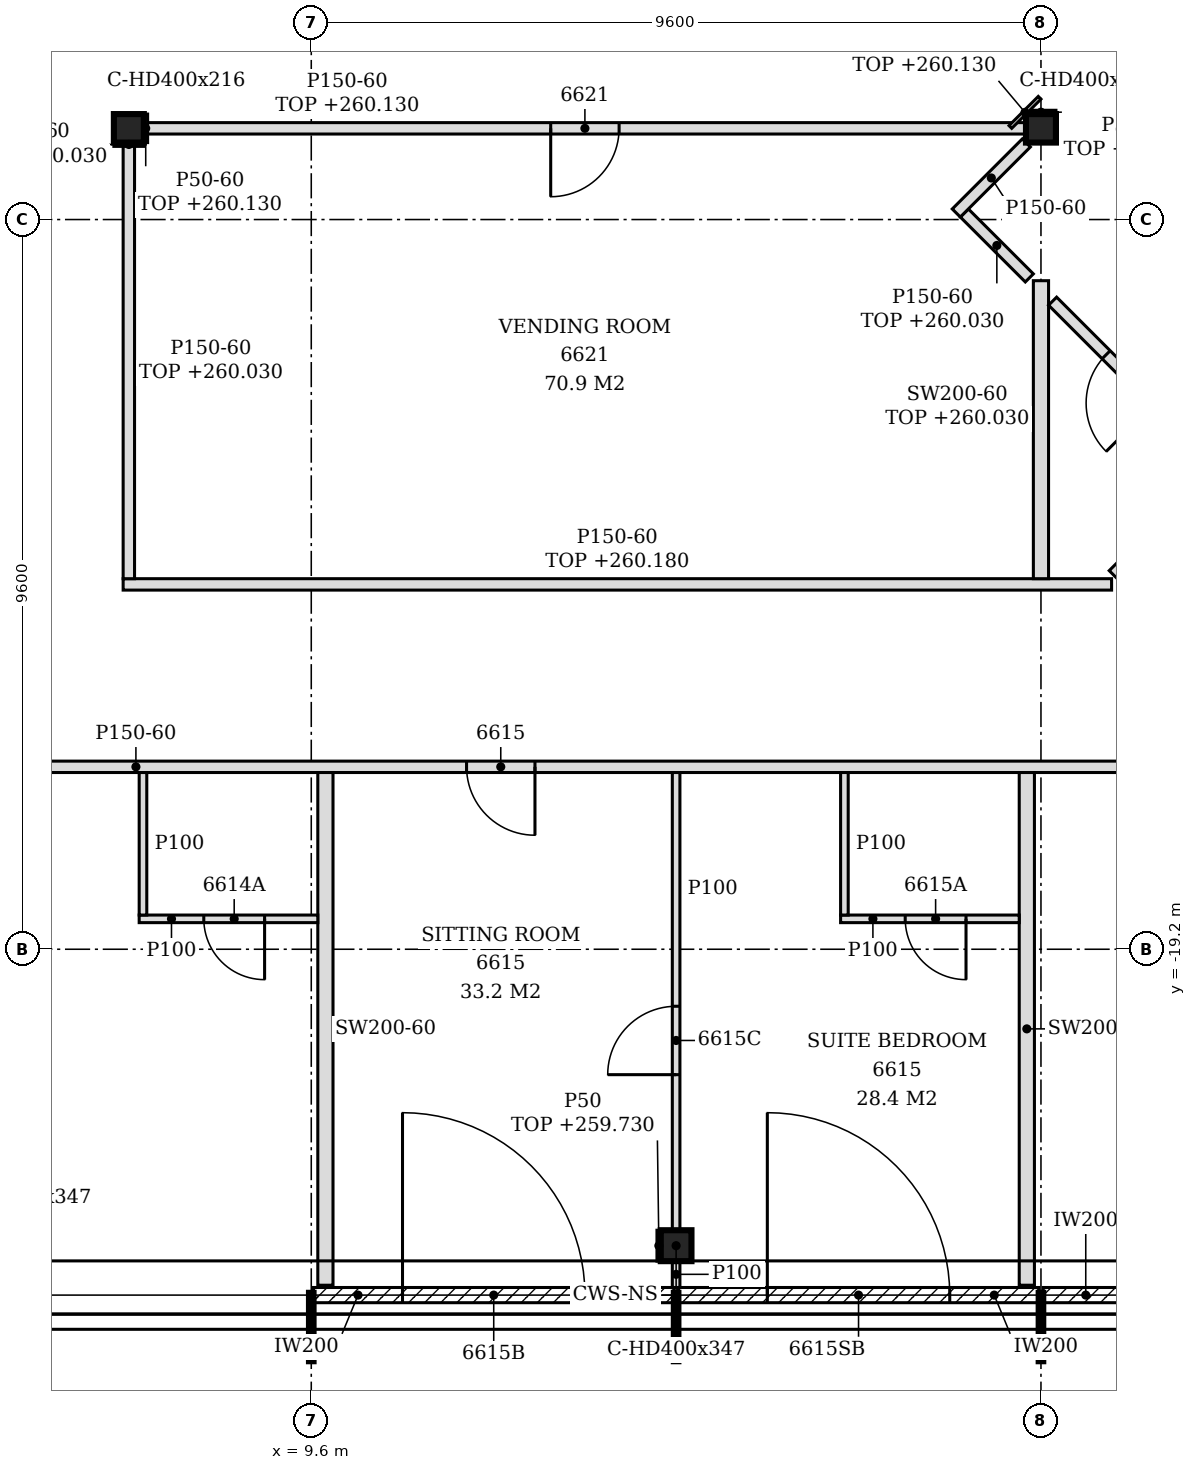
"""IFC4 building model, lengths in metres.
Left out: names, types, materials, properties, quantities, classifications, styles, units other than length and angle.
Written with IfcOpenShell. Run it as: python <this file> out.ifc"""

import sys

from ifc_helpers import new_model, si_unit, direction, frame, frame_2d, origin, origin_2d, place, context, subcontext, project, spatial, polyline, rectangle, i_section, outline, extrude, element, fill, save


model = new_model("IFC4")
c1 = context("Model", 3, precision=1e-05, world=origin(), true_north=direction((0.0, 1.0)))
c2 = subcontext(c1, "Body", "Model", "MODEL_VIEW")
j1 = project(units=[si_unit("LENGTHUNIT", "METRE"), si_unit("PLANEANGLEUNIT", "RADIAN")], contexts=[c1])
p1 = place(None, origin())
s1 = spatial("IfcSite", under=j1, at=p1, CompositionType="ELEMENT")
p2 = place(p1, origin())
s2 = spatial("IfcBuilding", under=s1, at=p2, CompositionType="ELEMENT")
p3 = place(p2, frame((0.0, 0.0, 257.4)))
s3 = spatial("IfcBuildingStorey", under=s2, at=p3, CompositionType="ELEMENT", Elevation=257.4)
p4 = place(p3, frame((14.4, -23.1, -0.15), z_axis=(0.0, 0.0, 1.0), x_axis=(1.0, 0.0, 0.0)))
e1 = element("IfcColumn", 1, at=p4, inside=s3, PredefinedType="COLUMN", context=c2, shape_type="SweptSolid", body=[
    extrude(i_section(OverallWidth=0.404, OverallDepth=0.407, WebThickness=0.027, FlangeThickness=0.044, FilletRadius=0.015, at=origin_2d()), origin(), (0.0, 0.0, 1.0), 3.5),
])
for number, where, z_axis, x_axis in (
    (2, (7.2, -8.4, -0.15), (0.0, 0.0, 1.0), (1.0, 0.0, 0.0)),
    (3, (19.2, -8.4, -0.15), (0.0, 0.0, 1.0), (1.0, 0.0, 0.0)),
):
    element("IfcColumn", number, at=place(p3, frame(where, z_axis=z_axis, x_axis=x_axis)), inside=s3, PredefinedType="COLUMN", context=c2, shape_type="SweptSolid", body=[
        extrude(i_section(OverallWidth=0.394, OverallDepth=0.375, WebThickness=0.017, FlangeThickness=0.028, FilletRadius=0.015, at=origin_2d()), origin(), (0.0, 0.0, 1.0), 3.5),
    ])
p5 = place(p3, frame((9.63, -23.75, 0.0), z_axis=(0.0, 0.0, 1.0), x_axis=(1.0, 0.0, 0.0)))
e4 = element("IfcWall", 4, at=p5, inside=s3, PredefinedType="NOTDEFINED", context=c2, shape_type="SweptSolid", body=[
    extrude(rectangle(XDim=4.74, YDim=0.2, at=frame_2d((2.37, 0.0))), origin(), (0.0, 0.0, 1.0), 3.35),
])
p6 = place(p5, frame((1.17, 0.0, 0.0)))
e5 = element("IfcOpeningElement", 5, at=p6, cuts=e4, PredefinedType="OPENING", context=c2, shape_type="SweptSolid", body=[
    extrude(rectangle(XDim=2.4, YDim=2.4, at=frame_2d((1.2, 1.2))), frame((0.0, 0.11, 0.0), z_axis=(0.0, -1.0, 0.0), x_axis=(1.0, 0.0, 0.0)), (0.0, 0.0, 1.0), 0.22),
])
p7 = place(p3, frame((14.43, -23.75, 0.0), z_axis=(0.0, 0.0, 1.0), x_axis=(1.0, 0.0, 0.0)))
e6 = element("IfcWall", 6, at=p7, inside=s3, PredefinedType="NOTDEFINED", context=c2, shape_type="SweptSolid", body=[
    extrude(rectangle(XDim=4.74, YDim=0.2, at=frame_2d((2.37, 0.0))), origin(), (0.0, 0.0, 1.0), 3.35),
])
p8 = place(p7, frame((1.17, 0.0, 0.0)))
e7 = element("IfcOpeningElement", 7, at=p8, cuts=e6, PredefinedType="OPENING", context=c2, shape_type="SweptSolid", body=[
    extrude(rectangle(XDim=2.4, YDim=2.4, at=frame_2d((1.2, 1.2))), frame((0.0, 0.11, 0.0), z_axis=(0.0, -1.0, 0.0), x_axis=(1.0, 0.0, 0.0)), (0.0, 0.0, 1.0), 0.22),
])
p9 = place(p3, frame((19.23, -23.75, 0.0), z_axis=(0.0, 0.0, 1.0), x_axis=(1.0, 0.0, 0.0)))
e8 = element("IfcWall", 8, at=p9, inside=s3, PredefinedType="NOTDEFINED", context=c2, shape_type="SweptSolid", body=[
    extrude(rectangle(XDim=4.626, YDim=0.2, at=frame_2d((2.313, 0.0))), origin(), (0.0, 0.0, 1.0), 3.35),
])
p10 = place(p9, frame((1.119, 0.0, 0.0)))
e9 = element("IfcOpeningElement", 9, at=p10, cuts=e8, PredefinedType="OPENING", context=c2, shape_type="SweptSolid", body=[
    extrude(rectangle(XDim=2.4, YDim=2.4, at=frame_2d((1.2, 1.2))), frame((0.0, 0.11, 0.0), z_axis=(0.0, -1.0, 0.0), x_axis=(1.0, 0.0, 0.0)), (0.0, 0.0, 1.0), 0.22),
])
p11 = place(p3, frame((14.4, -23.65, 0.0), z_axis=(0.0, 0.0, 1.0), x_axis=(0.0, 1.0, 0.0)))
e10 = element("IfcWall", 10, at=p11, inside=s3, PredefinedType="PARTITIONING", context=c2, shape_type="SweptSolid", body=[
    extrude(outline(polyline([(0.0, 0.0), (0.346, 0.0), (0.346, 2.33), (0.05, 2.33), (0.048, 3.35), (0.0, 3.35), (0.0, 0.0)])), frame((0.0, 0.05, 0.0), z_axis=(0.0, -1.0, 0.0), x_axis=(1.0, 0.0, 0.0)), (0.0, 0.0, 1.0), 0.1),
])
p12 = place(p3, frame((9.786, -23.62, 0.0), z_axis=(0.0, 0.0, 1.0), x_axis=(0.0, 1.0, 0.0)))
e11 = element("IfcWall", 11, at=p12, inside=s3, PredefinedType="PARTITIONING", context=c2, shape_type="SweptSolid", body=[
    extrude(outline(polyline([(0.0, 0.0), (6.745, 0.0), (6.745, 3.35), (4.525, 3.35), (4.523, 2.78), (4.315, 2.78), (4.313, 3.35), (1.02, 3.35), (1.018, 2.33), (0.02, 2.33), (0.018, 3.35), (0.0, 3.35), (0.0, 0.0)])), frame((0.0, 0.1, 0.0), z_axis=(0.0, -1.0, 0.0), x_axis=(1.0, 0.0, 0.0)), (0.0, 0.0, 1.0), 0.2),
])
p13 = place(p3, frame((19.014, -23.62, 0.0), z_axis=(0.0, 0.0, 1.0), x_axis=(0.0, 1.0, 0.0)))
e12 = element("IfcWall", 12, at=p13, inside=s3, PredefinedType="PARTITIONING", context=c2, shape_type="SweptSolid", body=[
    extrude(outline(polyline([(0.0, 0.0), (6.745, 0.0), (6.745, 2.63), (1.02, 2.63), (1.018, 2.33), (0.02, 2.33), (0.018, 3.35), (0.0, 3.35), (0.0, 0.0)])), frame((0.0, 0.1, 0.0), z_axis=(0.0, -1.0, 0.0), x_axis=(1.0, 0.0, 0.0)), (0.0, 0.0, 1.0), 0.2),
])
p14 = place(p3, frame((14.4, -22.896, 0.0), z_axis=(0.0, 0.0, 1.0), x_axis=(0.0, 1.0, 0.0)))
e13 = element("IfcWall", 13, at=p14, inside=s3, PredefinedType="PARTITIONING", context=c2, shape_type="SweptSolid", body=[
    extrude(outline(polyline([(0.0, 0.0), (6.021, 0.0), (6.021, 3.35), (3.802, 3.35), (3.8, 2.78), (3.592, 2.78), (3.59, 3.35), (0.296, 3.35), (0.294, 2.33), (0.0, 2.33), (0.0, 0.0)])), frame((0.0, 0.05, 0.0), z_axis=(0.0, -1.0, 0.0), x_axis=(1.0, 0.0, 0.0)), (0.0, 0.0, 1.0), 0.1),
])
p15 = place(p14, frame((2.046, 0.0, 0.0)))
e14 = element("IfcOpeningElement", 14, at=p15, cuts=e13, PredefinedType="OPENING", context=c2, shape_type="SweptSolid", body=[
    extrude(rectangle(XDim=0.9, YDim=2.1, at=frame_2d((0.45, 1.05))), frame((0.0, 0.06, 0.0), z_axis=(0.0, -1.0, 0.0), x_axis=(1.0, 0.0, 0.0)), (0.0, 0.0, 1.0), 0.12),
])
p16 = place(p3, frame((7.336, -18.8, 0.0), z_axis=(0.0, 0.0, 1.0), x_axis=(1.0, 0.0, 0.0)))
e15 = element("IfcWall", 15, at=p16, inside=s3, PredefinedType="PARTITIONING", context=c2, shape_type="SweptSolid", body=[
    extrude(outline(polyline([(0.0, 0.0), (2.35, 0.0), (2.35, 3.35), (0.014, 3.35), (0.012, 2.63), (0.0, 2.63), (0.0, 0.0)])), frame((0.0, 0.05, 0.0), z_axis=(0.0, -1.0, 0.0), x_axis=(1.0, 0.0, 0.0)), (0.0, 0.0, 1.0), 0.1),
])
p17 = place(p16, frame((0.85, 0.0, 0.0)))
e16 = element("IfcOpeningElement", 16, at=p17, cuts=e15, PredefinedType="OPENING", context=c2, shape_type="SweptSolid", body=[
    extrude(rectangle(XDim=0.8, YDim=2.1, at=frame_2d((0.4, 1.05))), frame((0.0, 0.06, 0.0), z_axis=(0.0, -1.0, 0.0), x_axis=(1.0, 0.0, 0.0)), (0.0, 0.0, 1.0), 0.12),
])
p18 = place(p3, frame((7.386, -18.75, 0.0), z_axis=(0.0, 0.0, 1.0), x_axis=(0.0, 1.0, 0.0)))
e17 = element("IfcWall", 17, at=p18, inside=s3, PredefinedType="PARTITIONING", context=c2, shape_type="SweptSolid", body=[
    extrude(rectangle(XDim=1.875, YDim=0.1, at=frame_2d((0.938, 0.0))), origin(), (0.0, 0.0, 1.0), 3.35),
])
p19 = place(p3, frame((16.564, -18.8, 0.0), z_axis=(0.0, 0.0, 1.0), x_axis=(1.0, 0.0, 0.0)))
e18 = element("IfcWall", 18, at=p19, inside=s3, PredefinedType="PARTITIONING", context=c2, shape_type="SweptSolid", body=[
    extrude(rectangle(XDim=2.35, YDim=0.1, at=frame_2d((1.175, 0.0))), origin(), (0.0, 0.0, 1.0), 3.35),
])
p20 = place(p19, frame((0.85, 0.0, 0.0)))
e19 = element("IfcOpeningElement", 19, at=p20, cuts=e18, PredefinedType="OPENING", context=c2, shape_type="SweptSolid", body=[
    extrude(rectangle(XDim=0.8, YDim=2.1, at=frame_2d((0.4, 1.05))), frame((0.0, 0.06, 0.0), z_axis=(0.0, -1.0, 0.0), x_axis=(1.0, 0.0, 0.0)), (0.0, 0.0, 1.0), 0.12),
])
p21 = place(p3, frame((16.614, -18.75, 0.0), z_axis=(0.0, 0.0, 1.0), x_axis=(0.0, 1.0, 0.0)))
e20 = element("IfcWall", 20, at=p21, inside=s3, PredefinedType="PARTITIONING", context=c2, shape_type="SweptSolid", body=[
    extrude(rectangle(XDim=1.875, YDim=0.1, at=frame_2d((0.938, 0.0))), origin(), (0.0, 0.0, 1.0), 3.35),
])
p22 = place(p3, frame((-0.85, -16.8, 0.0), z_axis=(0.0, 0.0, 1.0), x_axis=(1.0, 0.0, 0.0)))
e21 = element("IfcWall", 21, at=p22, inside=s3, PredefinedType="PARTITIONING", context=c2, shape_type="SweptSolid", body=[
    extrude(outline(polyline([(0.0, 0.0), (21.974, 0.0), (21.974, 3.35), (20.199, 3.35), (20.198, 2.63), (19.899, 2.63), (19.897, 3.35), (8.199, 3.35), (8.198, 2.63), (7.899, 2.63), (7.897, 3.35), (0.712, 3.35), (0.71, 2.674), (0.504, 2.674), (0.502, 2.33), (0.0, 2.33), (0.0, 0.0)])), frame((0.0, 0.075, 0.0), z_axis=(0.0, -1.0, 0.0), x_axis=(1.0, 0.0, 0.0)), (0.0, 0.0, 1.0), 0.15),
])
p23 = place(p22, frame((2.893, 0.0, 0.0)))
e22 = element("IfcOpeningElement", 22, at=p23, cuts=e21, PredefinedType="OPENING", context=c2, shape_type="SweptSolid", body=[
    extrude(rectangle(XDim=0.9, YDim=2.1, at=frame_2d((0.45, 1.05))), frame((0.0, 0.085, 0.0), z_axis=(0.0, -1.0, 0.0), x_axis=(1.0, 0.0, 0.0)), (0.0, 0.0, 1.0), 0.17),
])
p24 = place(p22, frame((12.492, 0.0, 0.0)))
e23 = element("IfcOpeningElement", 23, at=p24, cuts=e21, PredefinedType="OPENING", context=c2, shape_type="SweptSolid", body=[
    extrude(rectangle(XDim=0.9, YDim=2.1, at=frame_2d((0.45, 1.05))), frame((0.0, 0.085, 0.0), z_axis=(0.0, -1.0, 0.0), x_axis=(1.0, 0.0, 0.0)), (0.0, 0.0, 1.0), 0.17),
])
p25 = place(p3, frame((7.125, -14.4, 0.0), z_axis=(0.0, 0.0, 1.0), x_axis=(1.0, 0.0, 0.0)))
e24 = element("IfcWall", 24, at=p25, inside=s3, PredefinedType="PARTITIONING", context=c2, shape_type="SweptSolid", body=[
    extrude(outline(polyline([(0.0, 0.0), (13.004, 0.0), (13.004, 2.78), (12.225, 2.78), (12.223, 2.63), (11.925, 2.63), (11.923, 2.78), (0.225, 2.78), (0.223, 2.63), (0.0, 2.63), (0.0, 0.0)])), frame((0.0, 0.075, 0.0), z_axis=(0.0, -1.0, 0.0), x_axis=(1.0, 0.0, 0.0)), (0.0, 0.0, 1.0), 0.15),
])
p26 = place(p3, frame((7.2, -14.325, 0.0), z_axis=(0.0, 0.0, 1.0), x_axis=(0.0, 1.0, 0.0)))
e25 = element("IfcWall", 25, at=p26, inside=s3, PredefinedType="PARTITIONING", context=c2, shape_type="SweptSolid", body=[
    extrude(rectangle(XDim=5.738, YDim=0.15, at=frame_2d((2.869, 0.0))), origin(), (0.0, 0.0, 1.0), 2.63),
])
p27 = place(p3, frame((19.2, -14.325, 0.0), z_axis=(0.0, 0.0, 1.0), x_axis=(0.0, 1.0, 0.0)))
e26 = element("IfcWall", 26, at=p27, inside=s3, PredefinedType="PARTITIONING", context=c2, shape_type="SweptSolid", body=[
    extrude(rectangle(XDim=3.92, YDim=0.2, at=frame_2d((1.96, 0.0))), origin(), (0.0, 0.0, 1.0), 2.63),
])
p28 = place(p3, frame((20.151, -14.272, 0.0), z_axis=(0.0, 0.0, 1.0), x_axis=(0.707106781187, 0.707106781187, 0.0)))
e27 = element("IfcWall", 27, at=p28, inside=s3, PredefinedType="PARTITIONING", context=c2, shape_type="SweptSolid", body=[
    extrude(rectangle(XDim=2.055, YDim=0.15, at=frame_2d((1.027, 0.0))), origin(), (0.0, 0.0, 1.0), 2.78),
])
p29 = place(p3, frame((21.498, -12.819, 0.0), z_axis=(0.0, 0.0, 1.0), x_axis=(-0.707106781187, 0.707106781187, 0.0)))
e28 = element("IfcWall", 28, at=p29, inside=s3, PredefinedType="PARTITIONING", context=c2, shape_type="SweptSolid", body=[
    extrude(rectangle(XDim=3.033, YDim=0.15, at=frame_2d((1.517, 0.0))), origin(), (0.0, 0.0, 1.0), 2.63),
])
p30 = place(p29, frame((1.137, 0.0, 0.0)))
e29 = element("IfcOpeningElement", 29, at=p30, cuts=e28, PredefinedType="OPENING", context=c2, shape_type="SweptSolid", body=[
    extrude(rectangle(XDim=0.9, YDim=2.1, at=frame_2d((0.45, 1.05))), frame((0.0, 0.085, 0.0), z_axis=(0.0, -1.0, 0.0), x_axis=(1.0, 0.0, 0.0)), (0.0, 0.0, 1.0), 0.17),
])
p31 = place(p3, frame((19.047, -10.368, 0.0), z_axis=(0.0, 0.0, 1.0), x_axis=(-0.707409718716, 0.706803713817, 0.0)))
e30 = element("IfcWall", 30, at=p31, inside=s3, PredefinedType="PARTITIONING", context=c2, shape_type="SweptSolid", body=[
    extrude(rectangle(XDim=1.208, YDim=0.15, at=frame_2d((0.604, 0.0))), origin(), (0.0, 0.0, 1.0), 2.63),
])
p32 = place(p3, frame((18.086, -9.514, 0.0), z_axis=(0.0, 0.0, 1.0), x_axis=(0.707200419109, 0.707013130862, 0.0)))
e31 = element("IfcWall", 31, at=p32, inside=s3, PredefinedType="PARTITIONING", context=c2, shape_type="SweptSolid", body=[
    extrude(rectangle(XDim=1.303, YDim=0.15, at=frame_2d((0.652, 0.0))), origin(), (0.0, 0.0, 1.0), 3.35),
])
p33 = place(p3, frame((7.397, -8.4, 0.0), z_axis=(0.0, 0.0, 1.0), x_axis=(1.0, 0.0, 0.0)))
e32 = element("IfcWall", 32, at=p33, inside=s3, PredefinedType="PARTITIONING", context=c2, shape_type="SweptSolid", body=[
    extrude(rectangle(XDim=11.606, YDim=0.15, at=frame_2d((5.803, 0.0))), origin(), (0.0, 0.0, 1.0), 2.73),
])
p34 = place(p33, frame((5.353, 0.0, 0.0)))
e33 = element("IfcOpeningElement", 33, at=p34, cuts=e32, PredefinedType="OPENING", context=c2, shape_type="SweptSolid", body=[
    extrude(rectangle(XDim=0.9, YDim=2.1, at=frame_2d((0.45, 1.05))), frame((0.0, 0.085, 0.0), z_axis=(0.0, -1.0, 0.0), x_axis=(1.0, 0.0, 0.0)), (0.0, 0.0, 1.0), 0.17),
])
p35 = place(p3, frame((14.173, -23.303, 0.0), z_axis=(0.0, 0.0, 1.0), x_axis=(0.0, 1.0, 0.0)))
e34 = element("IfcWall", 34, at=p35, inside=s3, PredefinedType="PARTITIONING", context=c2, shape_type="SweptSolid", body=[
    extrude(rectangle(XDim=0.407, YDim=0.05, at=frame_2d((0.204, 0.0))), origin(), (0.0, 0.0, 1.0), 2.33),
])
p36 = place(p3, frame((7.422, -8.587, 0.0), z_axis=(0.0, 0.0, 1.0), x_axis=(0.0, 1.0, 0.0)))
e35 = element("IfcWall", 35, at=p36, inside=s3, PredefinedType="PARTITIONING", context=c2, shape_type="SweptSolid", body=[
    extrude(rectangle(XDim=0.375, YDim=0.05, at=frame_2d((0.188, 0.0))), origin(), (0.0, 0.0, 1.0), 2.73),
])
p37 = place(p3, frame((18.798, -8.382, 0.0), z_axis=(0.0, 0.0, 1.0), x_axis=(0.707106781187, 0.707106781187, 0.0)))
e36 = element("IfcWall", 36, at=p37, inside=s3, PredefinedType="PARTITIONING", context=c2, shape_type="SweptSolid", body=[
    extrude(rectangle(XDim=0.544, YDim=0.05, at=frame_2d((0.272, 0.0))), origin(), (0.0, 0.0, 1.0), 2.73),
])
p38 = place(p3, frame((7.003, -8.613, 0.0), z_axis=(0.0, 0.0, 1.0), x_axis=(1.0, 0.0, 0.0)))
e37 = element("IfcWall", 37, at=p38, inside=s3, PredefinedType="PARTITIONING", context=c2, shape_type="SweptSolid", body=[
    extrude(rectangle(XDim=0.394, YDim=0.05, at=frame_2d((0.197, 0.0))), origin(), (0.0, 0.0, 1.0), 2.63),
])
p39 = place(p3, frame((19.003, -8.188, 0.0), z_axis=(0.0, 0.0, 1.0), x_axis=(1.0, 0.0, 0.0)))
e38 = element("IfcWall", 38, at=p39, inside=s3, PredefinedType="PARTITIONING", context=c2, shape_type="SweptSolid", body=[
    extrude(rectangle(XDim=0.394, YDim=0.05, at=frame_2d((0.197, 0.0))), origin(), (0.0, 0.0, 1.0), 2.73),
])
p40 = place(p6, origin())
e39 = element("IfcDoor", 39, at=p40, inside=s3, OperationType="SINGLE_SWING_LEFT", PredefinedType="DOOR", context=c2, shape_type="SweptSolid", body=[
    extrude(rectangle(XDim=2.4, YDim=2.4, at=frame_2d((1.2, 1.2))), frame((0.0, 0.025, 0.0), z_axis=(0.0, -1.0, 0.0), x_axis=(1.0, 0.0, 0.0)), (0.0, 0.0, 1.0), 0.05),
])
fill(e5, e39)
p41 = place(p8, origin())
e40 = element("IfcDoor", 40, at=p41, inside=s3, OperationType="SINGLE_SWING_LEFT", PredefinedType="DOOR", context=c2, shape_type="SweptSolid", body=[
    extrude(rectangle(XDim=2.4, YDim=2.4, at=frame_2d((1.2, 1.2))), frame((0.0, 0.025, 0.0), z_axis=(0.0, -1.0, 0.0), x_axis=(1.0, 0.0, 0.0)), (0.0, 0.0, 1.0), 0.05),
])
fill(e7, e40)
p42 = place(p17, frame((0.8, 0.0, 0.0), z_axis=(0.0, 0.0, 1.0), x_axis=(-1.0, 0.0, 0.0)))
e41 = element("IfcDoor", 41, at=p42, inside=s3, OperationType="SINGLE_SWING_LEFT", PredefinedType="DOOR", context=c2, shape_type="SweptSolid", body=[
    extrude(rectangle(XDim=0.8, YDim=2.1, at=frame_2d((0.4, 1.05))), frame((0.0, 0.025, 0.0), z_axis=(0.0, -1.0, 0.0), x_axis=(1.0, 0.0, 0.0)), (0.0, 0.0, 1.0), 0.05),
])
fill(e16, e41)
p43 = place(p24, frame((0.9, 0.0, 0.0), z_axis=(0.0, 0.0, 1.0), x_axis=(-1.0, 0.0, 0.0)))
e42 = element("IfcDoor", 42, at=p43, inside=s3, OperationType="SINGLE_SWING_LEFT", PredefinedType="DOOR", context=c2, shape_type="SweptSolid", body=[
    extrude(rectangle(XDim=0.9, YDim=2.1, at=frame_2d((0.45, 1.05))), frame((0.0, 0.025, 0.0), z_axis=(0.0, -1.0, 0.0), x_axis=(1.0, 0.0, 0.0)), (0.0, 0.0, 1.0), 0.05),
])
fill(e23, e42)
p44 = place(p15, origin())
e43 = element("IfcDoor", 43, at=p44, inside=s3, OperationType="SINGLE_SWING_LEFT", PredefinedType="DOOR", context=c2, shape_type="SweptSolid", body=[
    extrude(rectangle(XDim=0.9, YDim=2.1, at=frame_2d((0.45, 1.05))), frame((0.0, 0.025, 0.0), z_axis=(0.0, -1.0, 0.0), x_axis=(1.0, 0.0, 0.0)), (0.0, 0.0, 1.0), 0.05),
])
fill(e14, e43)
p45 = place(p20, frame((0.8, 0.0, 0.0), z_axis=(0.0, 0.0, 1.0), x_axis=(-1.0, 0.0, 0.0)))
e44 = element("IfcDoor", 44, at=p45, inside=s3, OperationType="SINGLE_SWING_LEFT", PredefinedType="DOOR", context=c2, shape_type="SweptSolid", body=[
    extrude(rectangle(XDim=0.8, YDim=2.1, at=frame_2d((0.4, 1.05))), frame((0.0, 0.025, 0.0), z_axis=(0.0, -1.0, 0.0), x_axis=(1.0, 0.0, 0.0)), (0.0, 0.0, 1.0), 0.05),
])
fill(e19, e44)
p46 = place(p30, origin())
e45 = element("IfcDoor", 45, at=p46, inside=s3, OperationType="SINGLE_SWING_LEFT", PredefinedType="DOOR", context=c2, shape_type="SweptSolid", body=[
    extrude(rectangle(XDim=0.9, YDim=2.1, at=frame_2d((0.45, 1.05))), frame((0.0, 0.025, 0.0), z_axis=(0.0, -1.0, 0.0), x_axis=(1.0, 0.0, 0.0)), (0.0, 0.0, 1.0), 0.05),
])
fill(e29, e45)
p47 = place(p34, frame((0.9, 0.0, 0.0), z_axis=(0.0, 0.0, 1.0), x_axis=(-1.0, 0.0, 0.0)))
e46 = element("IfcDoor", 46, at=p47, inside=s3, OperationType="SINGLE_SWING_RIGHT", PredefinedType="DOOR", context=c2, shape_type="SweptSolid", body=[
    extrude(rectangle(XDim=0.9, YDim=2.1, at=frame_2d((0.45, 1.05))), frame((0.0, 0.025, 0.0), z_axis=(0.0, -1.0, 0.0), x_axis=(1.0, 0.0, 0.0)), (0.0, 0.0, 1.0), 0.05),
])
fill(e33, e46)
save(model, sys.argv[1])
